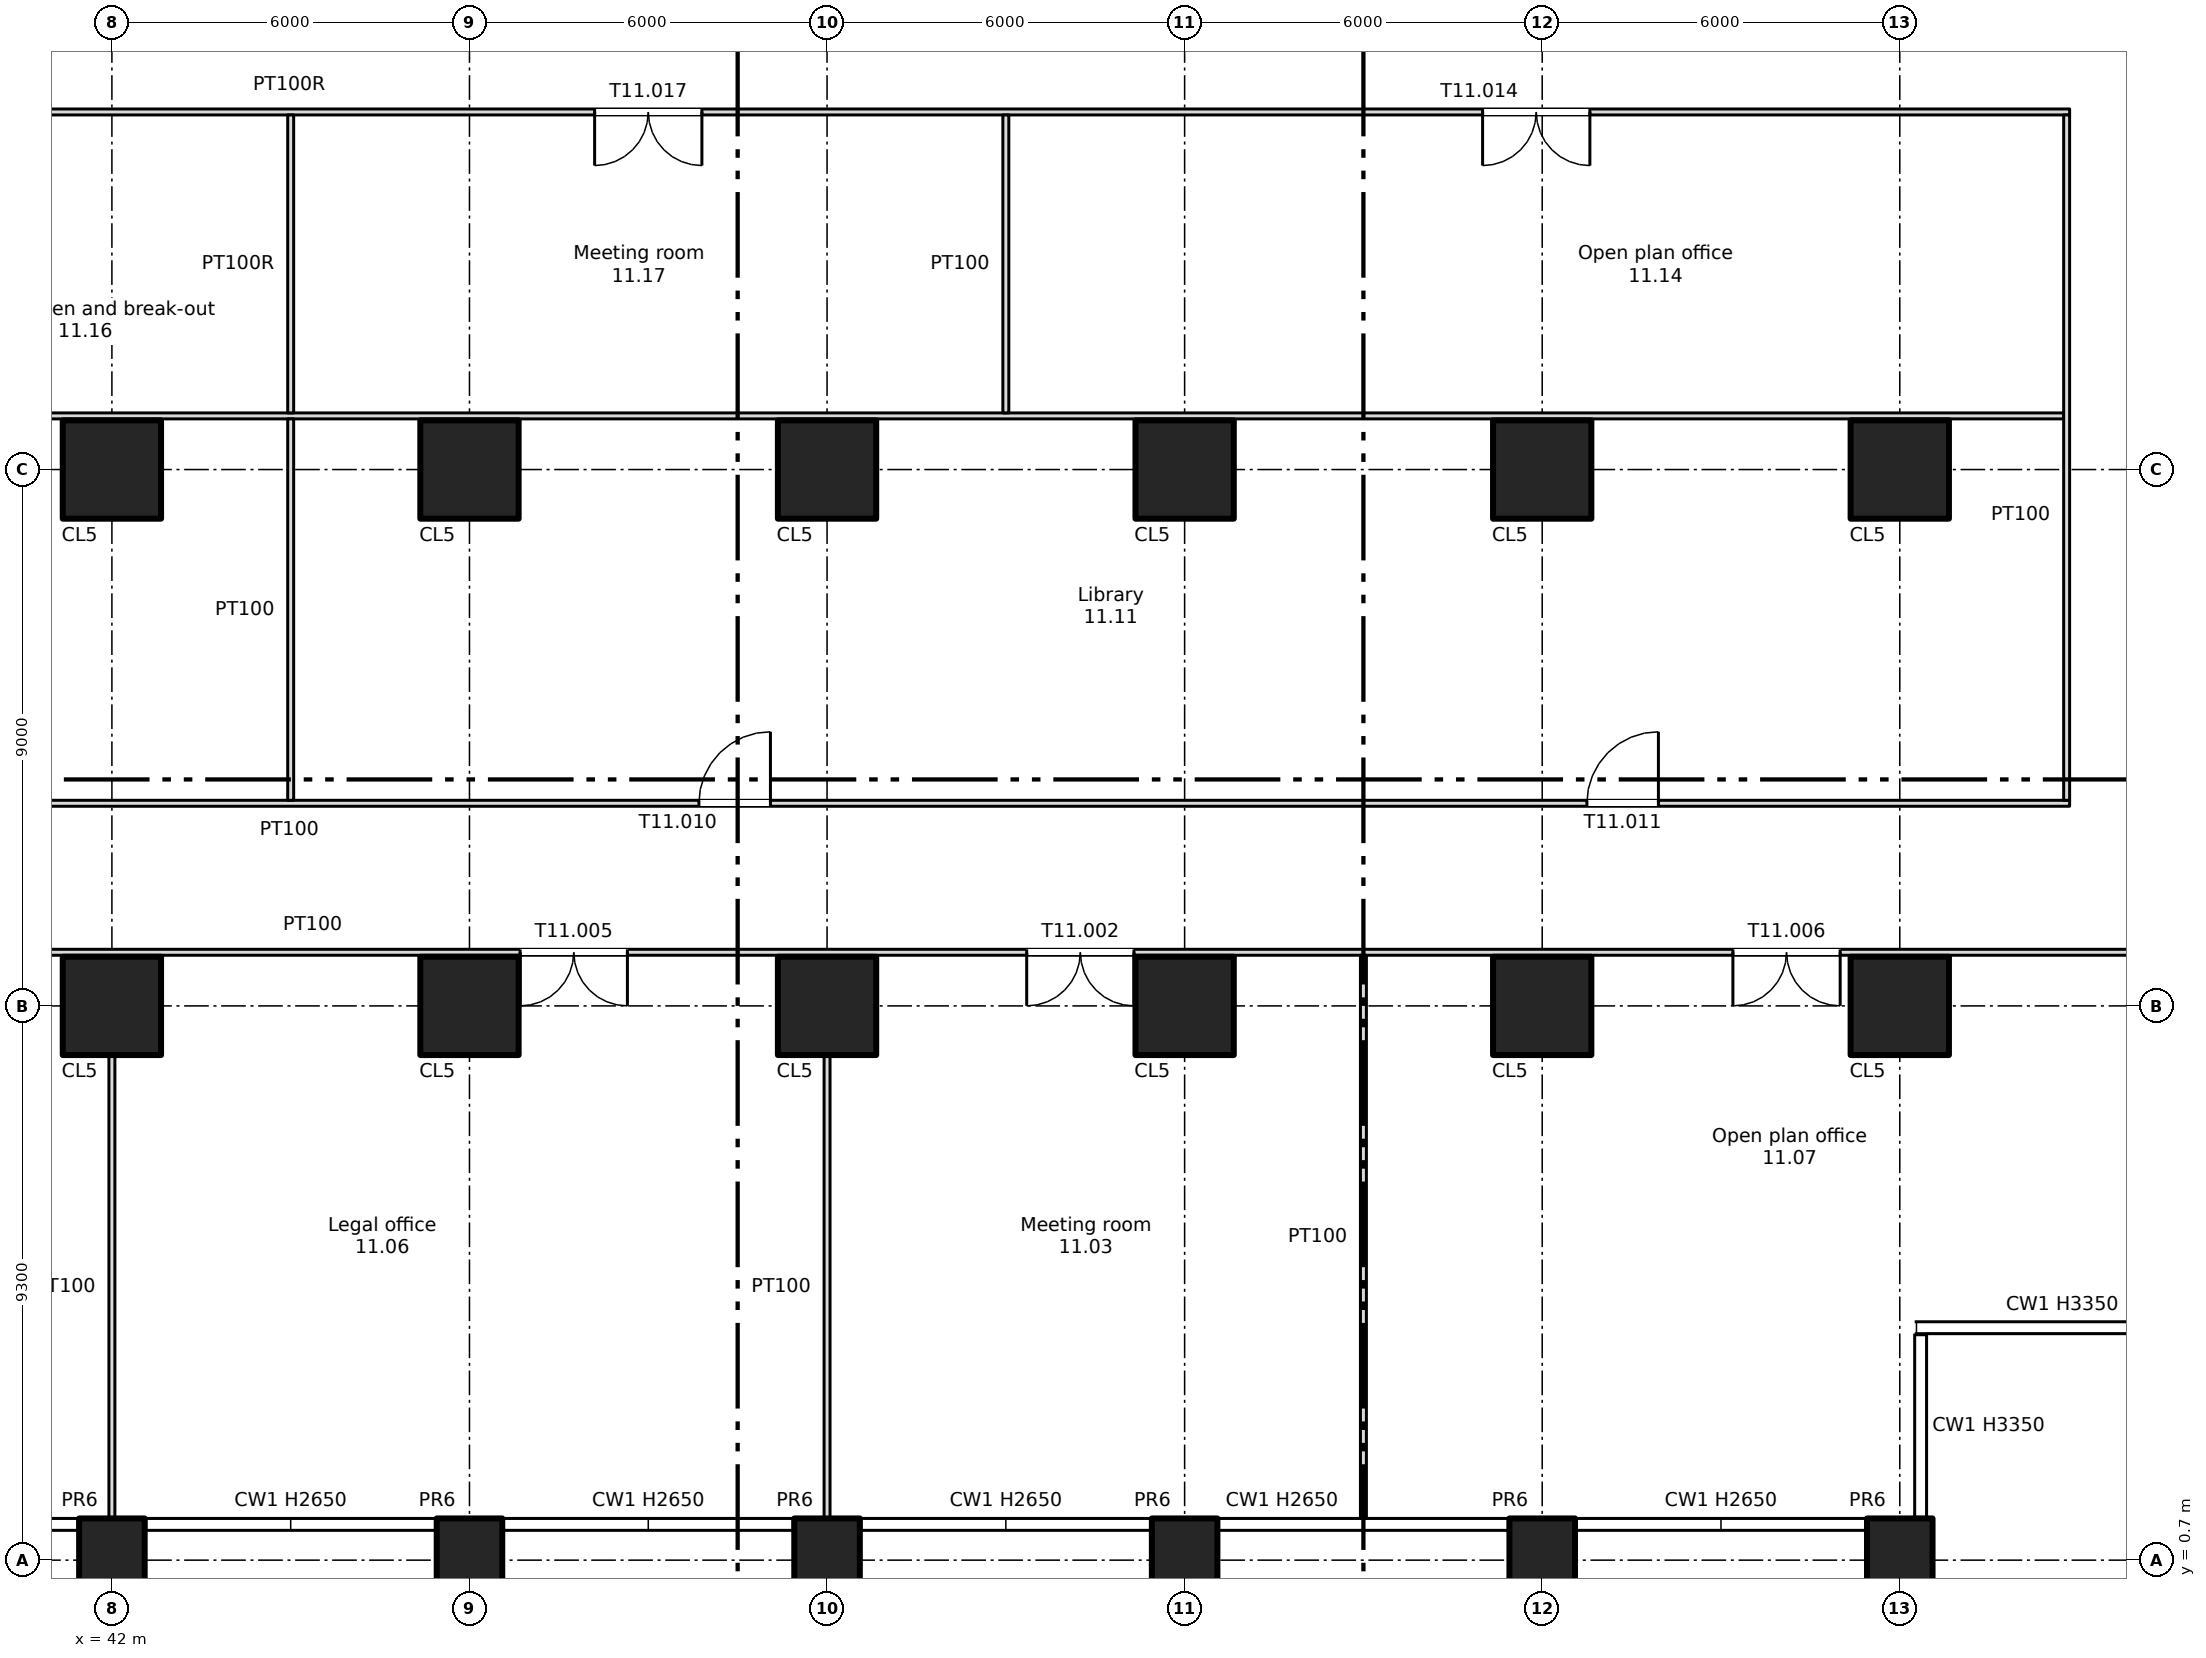
"""IFC4 building model, lengths in metres.
Left out: names, types, materials, properties, quantities, classifications, styles, units other than length and angle.
Written with IfcOpenShell. Run it as: python <this file> out.ifc"""

import sys

from ifc_helpers import new_model, si_unit, direction, frame, frame_2d, origin, origin_2d, place, context, subcontext, project, spatial, rectangle, extrude, element, fill, save


model = new_model("IFC4")
c1 = context("Model", 3, precision=1e-05, world=origin(), true_north=direction((0.0, 1.0)))
c2 = subcontext(c1, "Body", "Model", "MODEL_VIEW")
j1 = project(units=[si_unit("LENGTHUNIT", "METRE"), si_unit("PLANEANGLEUNIT", "RADIAN")], contexts=[c1])
p1 = place(None, origin())
s1 = spatial("IfcSite", under=j1, at=p1, CompositionType="ELEMENT")
p2 = place(p1, origin())
s2 = spatial("IfcBuilding", under=s1, at=p2, CompositionType="ELEMENT")
p3 = place(p2, frame((0.0, 0.0, 56.25)))
s3 = spatial("IfcBuildingStorey", under=s2, at=p3, CompositionType="ELEMENT", Elevation=56.25)
for number, where, z_axis, x_axis in (
    (1, (42.0, 0.7, -0.4), (0.0, 0.0, 1.0), (1.0, 0.0, 0.0)),
    (2, (48.0, 0.7, -0.4), (0.0, 0.0, 1.0), (1.0, 0.0, 0.0)),
    (3, (54.0, 0.7, -0.4), (0.0, 0.0, 1.0), (1.0, 0.0, 0.0)),
    (4, (60.0, 0.7, -0.4), (0.0, 0.0, 1.0), (1.0, 0.0, 0.0)),
    (5, (66.0, 0.7, -0.4), (0.0, 0.0, 1.0), (1.0, 0.0, 0.0)),
    (6, (72.0, 0.7, -0.4), (0.0, 0.0, 1.0), (1.0, 0.0, 0.0)),
):
    element("IfcColumn", number, at=place(p3, frame(where, z_axis=z_axis, x_axis=x_axis)), inside=s3, PredefinedType="COLUMN", context=c2, shape_type="SweptSolid", body=[
        extrude(rectangle(XDim=1.1, YDim=1.4, at=origin_2d()), origin(), (0.0, 0.0, 1.0), 3.75),
    ])
for number, where, z_axis, x_axis in (
    (7, (42.0, 10.0, 0.0), (0.0, 0.0, 1.0), (1.0, 0.0, 0.0)),
    (8, (42.0, 19.0, 0.0), (0.0, 0.0, 1.0), (1.0, 0.0, 0.0)),
    (9, (48.0, 10.0, 0.0), (0.0, 0.0, 1.0), (1.0, 0.0, 0.0)),
    (10, (48.0, 19.0, 0.0), (0.0, 0.0, 1.0), (1.0, 0.0, 0.0)),
    (11, (54.0, 10.0, 0.0), (0.0, 0.0, 1.0), (1.0, 0.0, 0.0)),
    (12, (54.0, 19.0, 0.0), (0.0, 0.0, 1.0), (1.0, 0.0, 0.0)),
    (13, (60.0, 10.0, 0.0), (0.0, 0.0, 1.0), (1.0, 0.0, 0.0)),
    (14, (60.0, 19.0, 0.0), (0.0, 0.0, 1.0), (1.0, 0.0, 0.0)),
    (15, (66.0, 10.0, 0.0), (0.0, 0.0, 1.0), (1.0, 0.0, 0.0)),
    (16, (66.0, 19.0, 0.0), (0.0, 0.0, 1.0), (1.0, 0.0, 0.0)),
    (17, (72.0, 10.0, 0.0), (0.0, 0.0, 1.0), (1.0, 0.0, 0.0)),
    (18, (72.0, 19.0, 0.0), (0.0, 0.0, 1.0), (1.0, 0.0, 0.0)),
):
    element("IfcColumn", number, at=place(p3, frame(where, z_axis=z_axis, x_axis=x_axis)), inside=s3, PredefinedType="COLUMN", context=c2, shape_type="SweptSolid", body=[
        extrude(rectangle(XDim=1.65, YDim=1.65, at=origin_2d()), origin(), (0.0, 0.0, 1.0), 3.35),
    ])
p4 = place(p3, frame((0.8, 10.9, 0.0), z_axis=(0.0, 0.0, 1.0), x_axis=(1.0, 0.0, 0.0)))
e19 = element("IfcWall", 19, at=p4, inside=s3, PredefinedType="PARTITIONING", context=c2, shape_type="SweptSolid", body=[
    extrude(rectangle(XDim=76.4, YDim=0.1, at=frame_2d((38.2, 0.0))), origin(), (0.0, 0.0, 1.0), 3.35),
])
p5 = place(p4, frame((12.05, 0.0, 0.0)))
e20 = element("IfcOpeningElement", 20, at=p5, cuts=e19, PredefinedType="OPENING", context=c2, shape_type="SweptSolid", body=[
    extrude(rectangle(XDim=1.8, YDim=2.1, at=frame_2d((0.9, 1.05))), frame((0.0, 0.06, 0.0), z_axis=(0.0, -1.0, 0.0), x_axis=(1.0, 0.0, 0.0)), (0.0, 0.0, 1.0), 0.12),
])
p6 = place(p4, frame((56.55, 0.0, 0.0)))
e21 = element("IfcOpeningElement", 21, at=p6, cuts=e19, PredefinedType="OPENING", context=c2, shape_type="SweptSolid", body=[
    extrude(rectangle(XDim=1.8, YDim=2.1, at=frame_2d((0.9, 1.05))), frame((0.0, 0.06, 0.0), z_axis=(0.0, -1.0, 0.0), x_axis=(1.0, 0.0, 0.0)), (0.0, 0.0, 1.0), 0.12),
])
p7 = place(p4, frame((24.05, 0.0, 0.0)))
e22 = element("IfcOpeningElement", 22, at=p7, cuts=e19, PredefinedType="OPENING", context=c2, shape_type="SweptSolid", body=[
    extrude(rectangle(XDim=1.8, YDim=2.1, at=frame_2d((0.9, 1.05))), frame((0.0, 0.06, 0.0), z_axis=(0.0, -1.0, 0.0), x_axis=(1.0, 0.0, 0.0)), (0.0, 0.0, 1.0), 0.12),
])
p8 = place(p4, frame((36.05, 0.0, 0.0)))
e23 = element("IfcOpeningElement", 23, at=p8, cuts=e19, PredefinedType="OPENING", context=c2, shape_type="SweptSolid", body=[
    extrude(rectangle(XDim=1.8, YDim=2.1, at=frame_2d((0.9, 1.05))), frame((0.0, 0.06, 0.0), z_axis=(0.0, -1.0, 0.0), x_axis=(1.0, 0.0, 0.0)), (0.0, 0.0, 1.0), 0.12),
])
p9 = place(p4, frame((48.05, 0.0, 0.0)))
e24 = element("IfcOpeningElement", 24, at=p9, cuts=e19, PredefinedType="OPENING", context=c2, shape_type="SweptSolid", body=[
    extrude(rectangle(XDim=1.8, YDim=2.1, at=frame_2d((0.9, 1.05))), frame((0.0, 0.06, 0.0), z_axis=(0.0, -1.0, 0.0), x_axis=(1.0, 0.0, 0.0)), (0.0, 0.0, 1.0), 0.12),
])
p10 = place(p4, frame((68.4, 0.0, 0.0)))
e25 = element("IfcOpeningElement", 25, at=p10, cuts=e19, PredefinedType="OPENING", context=c2, shape_type="SweptSolid", body=[
    extrude(rectangle(XDim=1.8, YDim=2.1, at=frame_2d((0.9, 1.05))), frame((0.0, 0.06, 0.0), z_axis=(0.0, -1.0, 0.0), x_axis=(1.0, 0.0, 0.0)), (0.0, 0.0, 1.0), 0.12),
])
p11 = place(p4, frame((2.45, 0.0, 0.0)))
e26 = element("IfcOpeningElement", 26, at=p11, cuts=e19, PredefinedType="OPENING", context=c2, shape_type="SweptSolid", body=[
    extrude(rectangle(XDim=1.8, YDim=2.1, at=frame_2d((0.9, 1.05))), frame((0.0, 0.06, 0.0), z_axis=(0.0, -1.0, 0.0), x_axis=(1.0, 0.0, 0.0)), (0.0, 0.0, 1.0), 0.12),
])
p12 = place(p3, frame((3.15, 13.4, 0.0), z_axis=(0.0, 0.0, 1.0), x_axis=(1.0, 0.0, 0.0)))
e27 = element("IfcWall", 27, at=p12, inside=s3, PredefinedType="PARTITIONING", context=c2, shape_type="SweptSolid", body=[
    extrude(rectangle(XDim=71.7, YDim=0.1, at=frame_2d((35.85, 0.0))), origin(), (0.0, 0.0, 1.0), 3.35),
])
p13 = place(p12, frame((6.55, 0.0, 0.0)))
e28 = element("IfcOpeningElement", 28, at=p13, cuts=e27, PredefinedType="OPENING", context=c2, shape_type="SweptSolid", body=[
    extrude(rectangle(XDim=1.8, YDim=2.1, at=frame_2d((0.9, 1.05))), frame((0.0, 0.06, 0.0), z_axis=(0.0, -1.0, 0.0), x_axis=(1.0, 0.0, 0.0)), (0.0, 0.0, 1.0), 0.12),
])
p14 = place(p12, frame((33.45, 0.0, 0.0)))
e29 = element("IfcOpeningElement", 29, at=p14, cuts=e27, PredefinedType="OPENING", context=c2, shape_type="SweptSolid", body=[
    extrude(rectangle(XDim=1.8, YDim=2.1, at=frame_2d((0.9, 1.05))), frame((0.0, 0.06, 0.0), z_axis=(0.0, -1.0, 0.0), x_axis=(1.0, 0.0, 0.0)), (0.0, 0.0, 1.0), 0.12),
])
p15 = place(p12, frame((48.7, 0.0, 0.0)))
e30 = element("IfcOpeningElement", 30, at=p15, cuts=e27, PredefinedType="OPENING", context=c2, shape_type="SweptSolid", body=[
    extrude(rectangle(XDim=1.2, YDim=2.1, at=frame_2d((0.6, 1.05))), frame((0.0, 0.06, 0.0), z_axis=(0.0, -1.0, 0.0), x_axis=(1.0, 0.0, 0.0)), (0.0, 0.0, 1.0), 0.12),
])
p16 = place(p12, frame((63.6, 0.0, 0.0)))
e31 = element("IfcOpeningElement", 31, at=p16, cuts=e27, PredefinedType="OPENING", context=c2, shape_type="SweptSolid", body=[
    extrude(rectangle(XDim=1.2, YDim=2.1, at=frame_2d((0.6, 1.05))), frame((0.0, 0.06, 0.0), z_axis=(0.0, -1.0, 0.0), x_axis=(1.0, 0.0, 0.0)), (0.0, 0.0, 1.0), 0.12),
])
p17 = place(p12, frame((19.95, 0.0, 0.0)))
e32 = element("IfcOpeningElement", 32, at=p17, cuts=e27, PredefinedType="OPENING", context=c2, shape_type="SweptSolid", body=[
    extrude(rectangle(XDim=1.8, YDim=2.1, at=frame_2d((0.9, 1.05))), frame((0.0, 0.06, 0.0), z_axis=(0.0, -1.0, 0.0), x_axis=(1.0, 0.0, 0.0)), (0.0, 0.0, 1.0), 0.12),
])
p18 = place(p3, frame((3.25, 19.9, 0.0), z_axis=(0.0, 0.0, 1.0), x_axis=(1.0, 0.0, 0.0)))
e33 = element("IfcWall", 33, at=p18, inside=s3, PredefinedType="PARTITIONING", context=c2, shape_type="SweptSolid", body=[
    extrude(rectangle(XDim=71.5, YDim=0.1, at=frame_2d((35.75, 0.0))), origin(), (0.0, 0.0, 1.0), 3.35),
])
p19 = place(p3, frame((3.15, 25.0, 0.0), z_axis=(0.0, 0.0, 1.0), x_axis=(1.0, 0.0, 0.0)))
e34 = element("IfcWall", 34, at=p19, inside=s3, PredefinedType="PARTITIONING", context=c2, shape_type="SweptSolid", body=[
    extrude(rectangle(XDim=71.7, YDim=0.1, at=frame_2d((35.85, 0.0))), origin(), (0.0, 0.0, 1.0), 3.35),
])
p20 = place(p19, frame((8.05, 0.0, 0.0)))
e35 = element("IfcOpeningElement", 35, at=p20, cuts=e34, PredefinedType="OPENING", context=c2, shape_type="SweptSolid", body=[
    extrude(rectangle(XDim=1.8, YDim=2.1, at=frame_2d((0.9, 1.05))), frame((0.0, 0.06, 0.0), z_axis=(0.0, -1.0, 0.0), x_axis=(1.0, 0.0, 0.0)), (0.0, 0.0, 1.0), 0.12),
])
p21 = place(p19, frame((61.85, 0.0, 0.0)))
e36 = element("IfcOpeningElement", 36, at=p21, cuts=e34, PredefinedType="OPENING", context=c2, shape_type="SweptSolid", body=[
    extrude(rectangle(XDim=1.8, YDim=2.1, at=frame_2d((0.9, 1.05))), frame((0.0, 0.06, 0.0), z_axis=(0.0, -1.0, 0.0), x_axis=(1.0, 0.0, 0.0)), (0.0, 0.0, 1.0), 0.12),
])
p22 = place(p19, frame((22.95, 0.0, 0.0)))
e37 = element("IfcOpeningElement", 37, at=p22, cuts=e34, PredefinedType="OPENING", context=c2, shape_type="SweptSolid", body=[
    extrude(rectangle(XDim=1.8, YDim=2.1, at=frame_2d((0.9, 1.05))), frame((0.0, 0.06, 0.0), z_axis=(0.0, -1.0, 0.0), x_axis=(1.0, 0.0, 0.0)), (0.0, 0.0, 1.0), 0.12),
])
p23 = place(p19, frame((35.35, 0.0, 0.0)))
e38 = element("IfcOpeningElement", 38, at=p23, cuts=e34, PredefinedType="OPENING", context=c2, shape_type="SweptSolid", body=[
    extrude(rectangle(XDim=1.0, YDim=2.1, at=frame_2d((0.5, 1.05))), frame((0.0, 0.06, 0.0), z_axis=(0.0, -1.0, 0.0), x_axis=(1.0, 0.0, 0.0)), (0.0, 0.0, 1.0), 0.12),
])
p24 = place(p19, frame((46.95, 0.0, 0.0)))
e39 = element("IfcOpeningElement", 39, at=p24, cuts=e34, PredefinedType="OPENING", context=c2, shape_type="SweptSolid", body=[
    extrude(rectangle(XDim=1.8, YDim=2.1, at=frame_2d((0.9, 1.05))), frame((0.0, 0.06, 0.0), z_axis=(0.0, -1.0, 0.0), x_axis=(1.0, 0.0, 0.0)), (0.0, 0.0, 1.0), 0.12),
])
p25 = place(p3, frame((42.0, 1.4, 0.0), z_axis=(0.0, 0.0, 1.0), x_axis=(0.0, 1.0, 0.0)))
e40 = element("IfcWall", 40, at=p25, inside=s3, PredefinedType="PARTITIONING", context=c2, shape_type="SweptSolid", body=[
    extrude(rectangle(XDim=7.775, YDim=0.1, at=frame_2d((3.888, 0.0))), origin(), (0.0, 0.0, 1.0), 3.35),
])
p26 = place(p3, frame((45.0, 13.45, 0.0), z_axis=(0.0, 0.0, 1.0), x_axis=(0.0, 1.0, 0.0)))
e41 = element("IfcWall", 41, at=p26, inside=s3, PredefinedType="PARTITIONING", context=c2, shape_type="SweptSolid", body=[
    extrude(rectangle(XDim=6.4, YDim=0.1, at=frame_2d((3.2, 0.0))), origin(), (0.0, 0.0, 1.0), 3.35),
])
p27 = place(p3, frame((45.0, 19.95, 0.0), z_axis=(0.0, 0.0, 1.0), x_axis=(0.0, 1.0, 0.0)))
e42 = element("IfcWall", 42, at=p27, inside=s3, PredefinedType="PARTITIONING", context=c2, shape_type="SweptSolid", body=[
    extrude(rectangle(XDim=5.0, YDim=0.1, at=frame_2d((2.5, 0.0))), origin(), (0.0, 0.0, 1.0), 3.35),
])
p28 = place(p3, frame((54.0, 1.4, 0.0), z_axis=(0.0, 0.0, 1.0), x_axis=(0.0, 1.0, 0.0)))
e43 = element("IfcWall", 43, at=p28, inside=s3, PredefinedType="PARTITIONING", context=c2, shape_type="SweptSolid", body=[
    extrude(rectangle(XDim=7.775, YDim=0.1, at=frame_2d((3.888, 0.0))), origin(), (0.0, 0.0, 1.0), 3.35),
])
p29 = place(p3, frame((57.0, 19.95, 0.0), z_axis=(0.0, 0.0, 1.0), x_axis=(0.0, 1.0, 0.0)))
e44 = element("IfcWall", 44, at=p29, inside=s3, PredefinedType="PARTITIONING", context=c2, shape_type="SweptSolid", body=[
    extrude(rectangle(XDim=5.0, YDim=0.1, at=frame_2d((2.5, 0.0))), origin(), (0.0, 0.0, 1.0), 3.35),
])
p30 = place(p3, frame((63.0, 1.4, 0.0), z_axis=(0.0, 0.0, 1.0), x_axis=(0.0, 1.0, 0.0)))
e45 = element("IfcWall", 45, at=p30, inside=s3, PredefinedType="PARTITIONING", context=c2, shape_type="SweptSolid", body=[
    extrude(rectangle(XDim=9.45, YDim=0.1, at=frame_2d((4.725, 0.0))), origin(), (0.0, 0.0, 1.0), 3.35),
])
p31 = place(p3, frame((74.8, 13.45, 0.0), z_axis=(0.0, 0.0, 1.0), x_axis=(0.0, 1.0, 0.0)))
e46 = element("IfcWall", 46, at=p31, inside=s3, PredefinedType="PARTITIONING", context=c2, shape_type="SweptSolid", body=[
    extrude(rectangle(XDim=11.5, YDim=0.1, at=frame_2d((5.75, 0.0))), origin(), (0.0, 0.0, 1.0), 3.35),
])
p32 = place(p6, origin())
e47 = element("IfcDoor", 47, at=p32, inside=s3, OperationType="DOUBLE_DOOR_SINGLE_SWING", PredefinedType="DOOR", context=c2, shape_type="SweptSolid", body=[
    extrude(rectangle(XDim=1.8, YDim=2.1, at=frame_2d((0.9, 1.05))), frame((0.0, 0.025, 0.0), z_axis=(0.0, -1.0, 0.0), x_axis=(1.0, 0.0, 0.0)), (0.0, 0.0, 1.0), 0.05),
])
fill(e21, e47)
p33 = place(p9, origin())
e48 = element("IfcDoor", 48, at=p33, inside=s3, OperationType="DOUBLE_DOOR_SINGLE_SWING", PredefinedType="DOOR", context=c2, shape_type="SweptSolid", body=[
    extrude(rectangle(XDim=1.8, YDim=2.1, at=frame_2d((0.9, 1.05))), frame((0.0, 0.025, 0.0), z_axis=(0.0, -1.0, 0.0), x_axis=(1.0, 0.0, 0.0)), (0.0, 0.0, 1.0), 0.05),
])
fill(e24, e48)
p34 = place(p10, origin())
e49 = element("IfcDoor", 49, at=p34, inside=s3, OperationType="DOUBLE_DOOR_SINGLE_SWING", PredefinedType="DOOR", context=c2, shape_type="SweptSolid", body=[
    extrude(rectangle(XDim=1.8, YDim=2.1, at=frame_2d((0.9, 1.05))), frame((0.0, 0.025, 0.0), z_axis=(0.0, -1.0, 0.0), x_axis=(1.0, 0.0, 0.0)), (0.0, 0.0, 1.0), 0.05),
])
fill(e25, e49)
p35 = place(p15, origin())
e50 = element("IfcDoor", 50, at=p35, inside=s3, OperationType="SINGLE_SWING_RIGHT", PredefinedType="DOOR", context=c2, shape_type="SweptSolid", body=[
    extrude(rectangle(XDim=1.2, YDim=2.1, at=frame_2d((0.6, 1.05))), frame((0.0, 0.025, 0.0), z_axis=(0.0, -1.0, 0.0), x_axis=(1.0, 0.0, 0.0)), (0.0, 0.0, 1.0), 0.05),
])
fill(e30, e50)
p36 = place(p16, origin())
e51 = element("IfcDoor", 51, at=p36, inside=s3, OperationType="SINGLE_SWING_RIGHT", PredefinedType="DOOR", context=c2, shape_type="SweptSolid", body=[
    extrude(rectangle(XDim=1.2, YDim=2.1, at=frame_2d((0.6, 1.05))), frame((0.0, 0.025, 0.0), z_axis=(0.0, -1.0, 0.0), x_axis=(1.0, 0.0, 0.0)), (0.0, 0.0, 1.0), 0.05),
])
fill(e31, e51)
p37 = place(p21, origin())
e52 = element("IfcDoor", 52, at=p37, inside=s3, OperationType="DOUBLE_DOOR_SINGLE_SWING", PredefinedType="DOOR", context=c2, shape_type="SweptSolid", body=[
    extrude(rectangle(XDim=1.8, YDim=2.1, at=frame_2d((0.9, 1.05))), frame((0.0, 0.025, 0.0), z_axis=(0.0, -1.0, 0.0), x_axis=(1.0, 0.0, 0.0)), (0.0, 0.0, 1.0), 0.05),
])
fill(e36, e52)
p38 = place(p24, origin())
e53 = element("IfcDoor", 53, at=p38, inside=s3, OperationType="DOUBLE_DOOR_SINGLE_SWING", PredefinedType="DOOR", context=c2, shape_type="SweptSolid", body=[
    extrude(rectangle(XDim=1.8, YDim=2.1, at=frame_2d((0.9, 1.05))), frame((0.0, 0.025, 0.0), z_axis=(0.0, -1.0, 0.0), x_axis=(1.0, 0.0, 0.0)), (0.0, 0.0, 1.0), 0.05),
])
fill(e39, e53)
save(model, sys.argv[1])
